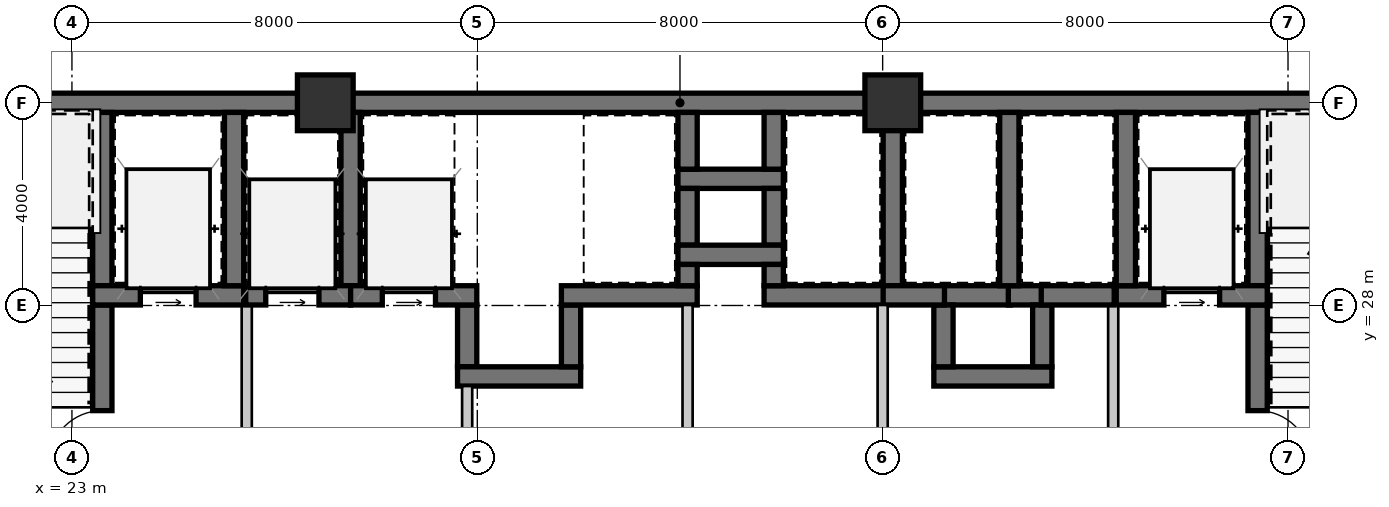
"""IFC4 building model, lengths in metres.
Left out: names, types, materials, properties, quantities, classifications, styles, units other than length and angle.
Written with IfcOpenShell. Run it as: python <this file> out.ifc"""

import sys

from ifc_helpers import new_model, si_unit, direction, frame, frame_2d, origin, origin_2d, place, context, subcontext, project, spatial, rectangle, extrude, source, transform, mapped, element, fill, save


model = new_model("IFC4")
c1 = context("Model", 3, precision=1e-05, world=origin(), true_north=direction((0.0, 1.0)))
c2 = subcontext(c1, "Body", "Model", "MODEL_VIEW")
j1 = project(units=[si_unit("LENGTHUNIT", "METRE"), si_unit("PLANEANGLEUNIT", "RADIAN")], contexts=[c1])
p1 = place(None, origin())
s1 = spatial("IfcSite", under=j1, at=p1, CompositionType="ELEMENT")
p2 = place(p1, origin())
s2 = spatial("IfcBuilding", under=s1, at=p2, CompositionType="ELEMENT")
p3 = place(p2, frame((0.0, 0.0, 8.4)))
s3 = spatial("IfcBuildingStorey", under=s2, at=p3, CompositionType="ELEMENT", Elevation=8.4)
m1 = source(origin(), c2, "Body", "SweptSolid", [
    extrude(rectangle(XDim=1.1, YDim=1.1, at=origin_2d()), origin(), (0.0, 0.0, 1.0), 4.55),
])
for number, where, z_axis, x_axis in (
    (1, (28.0, 32.0, 0.0), (0.0, 0.0, 1.0), (1.0, 0.0, 0.0)),
    (2, (39.2, 32.0, 0.0), (0.0, 0.0, 1.0), (1.0, 0.0, 0.0)),
):
    element("IfcColumn", number, at=place(p3, frame(where, z_axis=z_axis, x_axis=x_axis)), inside=s3, PredefinedType="COLUMN", context=c2, shape_type="MappedRepresentation", body=[
        mapped(m1, transform((0.0, 0.0, 0.0), scale=1.0)),
    ])
m2 = source(origin(), c2, "Body", "SweptSolid", [
    extrude(rectangle(XDim=9.19, YDim=0.38, at=frame_2d((4.595, 0.0))), origin(), (0.0, 0.0, 1.0), 4.29),
])
p4 = place(p3, frame((18.81, 32.0, 0.0), z_axis=(0.0, 0.0, 1.0), x_axis=(1.0, 0.0, 0.0)))
e3 = element("IfcWall", 3, at=p4, inside=s3, PredefinedType="SHEAR", context=c2, shape_type="MappedRepresentation", body=[
    mapped(m2, transform((0.0, 0.0, 0.0), scale=1.0)),
])
m3 = source(origin(), c2, "Body", "SweptSolid", [
    extrude(rectangle(XDim=11.2, YDim=0.38, at=frame_2d((5.6, 0.0))), origin(), (0.0, 0.0, 1.0), 4.29),
])
p5 = place(p3, frame((28.0, 32.0, 0.0), z_axis=(0.0, 0.0, 1.0), x_axis=(1.0, 0.0, 0.0)))
e4 = element("IfcWall", 4, at=p5, inside=s3, PredefinedType="SHEAR", context=c2, shape_type="MappedRepresentation", body=[
    mapped(m3, transform((0.0, 0.0, 0.0), scale=1.0)),
])
m4 = source(origin(), c2, "Body", "SweptSolid", [
    extrude(rectangle(XDim=11.99, YDim=0.38, at=frame_2d((5.995, 0.0))), origin(), (0.0, 0.0, 1.0), 4.29),
])
p6 = place(p3, frame((39.2, 32.0, 0.0), z_axis=(0.0, 0.0, 1.0), x_axis=(1.0, 0.0, 0.0)))
e5 = element("IfcWall", 5, at=p6, inside=s3, PredefinedType="SHEAR", context=c2, shape_type="MappedRepresentation", body=[
    mapped(m4, transform((0.0, 0.0, 0.0), scale=1.0)),
])
m5 = source(origin(), c2, "Body", "SweptSolid", [
    extrude(rectangle(XDim=3.42, YDim=0.38, at=frame_2d((1.71, 0.0))), origin(), (0.0, 0.0, 1.0), 4.29),
])
p7 = place(p3, frame((23.6, 28.39, 0.0), z_axis=(0.0, 0.0, 1.0), x_axis=(0.0, 1.0, 0.0)))
e6 = element("IfcWall", 6, at=p7, inside=s3, PredefinedType="SHEAR", context=c2, shape_type="MappedRepresentation", body=[
    mapped(m5, transform((0.0, 0.0, 0.0), scale=1.0)),
])
m6 = source(origin(), c2, "Body", "SweptSolid", [
    extrude(rectangle(XDim=3.82, YDim=0.38, at=frame_2d((1.91, 0.0))), origin(), (0.0, 0.0, 1.0), 4.29),
])
p8 = place(p3, frame((23.6, 24.19, 0.0), z_axis=(0.0, 0.0, 1.0), x_axis=(0.0, 1.0, 0.0)))
e7 = element("IfcWall", 7, at=p8, inside=s3, PredefinedType="SHEAR", context=c2, shape_type="MappedRepresentation", body=[
    mapped(m6, transform((0.0, 0.0, 0.0), scale=1.0)),
])
m7 = source(origin(), c2, "Body", "SweptSolid", [
    extrude(rectangle(XDim=1.05, YDim=2.1, at=frame_2d((0.525, 1.05))), frame((0.0, 0.2, 0.0), z_axis=(0.0, -1.0, 0.0), x_axis=(1.0, 0.0, 0.0)), (0.0, 0.0, 1.0), 0.4),
])
p9 = place(p8, frame((0.685, 0.0, 0.0)))
e8 = element("IfcOpeningElement", 8, at=p9, cuts=e7, PredefinedType="OPENING", context=c2, shape_type="MappedRepresentation", body=[
    mapped(m7, transform((0.0, 0.0, 0.0), scale=1.0)),
])
m8 = source(origin(), c2, "Body", "SweptSolid", [
    extrude(rectangle(XDim=2.98, YDim=0.38, at=frame_2d((1.49, 0.0))), origin(), (0.0, 0.0, 1.0), 4.29),
])
p10 = place(p3, frame((23.41, 28.2, 0.0), z_axis=(0.0, 0.0, 1.0), x_axis=(1.0, 0.0, 0.0)))
e9 = element("IfcWall", 9, at=p10, inside=s3, PredefinedType="SHEAR", context=c2, shape_type="MappedRepresentation", body=[
    mapped(m8, transform((0.0, 0.0, 0.0), scale=1.0)),
])
m9 = source(origin(), c2, "Body", "SweptSolid", [
    extrude(rectangle(XDim=1.1, YDim=2.15, at=frame_2d((0.55, 1.075))), frame((0.0, 0.2, 0.0), z_axis=(0.0, -1.0, 0.0), x_axis=(1.0, 0.0, 0.0)), (0.0, 0.0, 1.0), 0.4),
])
p11 = place(p10, frame((0.94, 0.0, 0.0)))
e10 = element("IfcOpeningElement", 10, at=p11, cuts=e9, PredefinedType="OPENING", context=c2, shape_type="MappedRepresentation", body=[
    mapped(m9, transform((0.0, 0.0, 0.0), scale=1.0)),
])
p12 = place(p3, frame((26.2, 28.39, 0.0), z_axis=(0.0, 0.0, 1.0), x_axis=(0.0, 1.0, 0.0)))
e11 = element("IfcWall", 11, at=p12, inside=s3, PredefinedType="SHEAR", context=c2, shape_type="MappedRepresentation", body=[
    mapped(m5, transform((0.0, 0.0, 0.0), scale=1.0)),
])
m10 = source(origin(), c2, "Body", "SweptSolid", [
    extrude(rectangle(XDim=3.91, YDim=0.2, at=frame_2d((1.955, 0.0))), origin(), (0.0, 0.0, 1.0), 4.29),
])
p13 = place(p3, frame((26.45, 24.1, 0.0), z_axis=(0.0, 0.0, 1.0), x_axis=(0.0, 1.0, 0.0)))
e12 = element("IfcWall", 12, at=p13, inside=s3, PredefinedType="SOLIDWALL", context=c2, shape_type="MappedRepresentation", body=[
    mapped(m10, transform((0.0, 0.0, 0.0), scale=1.0)),
])
p14 = place(p3, frame((46.4, 31.81, 0.0), z_axis=(0.0, 0.0, 1.0), x_axis=(0.0, -1.0, 0.0)))
e13 = element("IfcWall", 13, at=p14, inside=s3, PredefinedType="SHEAR", context=c2, shape_type="MappedRepresentation", body=[
    mapped(m5, transform((0.0, 0.0, 0.0), scale=1.0)),
])
p15 = place(p3, frame((46.4, 28.01, 0.0), z_axis=(0.0, 0.0, 1.0), x_axis=(0.0, -1.0, 0.0)))
e14 = element("IfcWall", 14, at=p15, inside=s3, PredefinedType="SHEAR", context=c2, shape_type="MappedRepresentation", body=[
    mapped(m6, transform((0.0, 0.0, 0.0), scale=1.0)),
])
p16 = place(p15, frame((2.085, 0.0, 0.0)))
e15 = element("IfcOpeningElement", 15, at=p16, cuts=e14, PredefinedType="OPENING", context=c2, shape_type="MappedRepresentation", body=[
    mapped(m7, transform((0.0, 0.0, 0.0), scale=1.0)),
])
p17 = place(p3, frame((43.61, 28.2, 0.0), z_axis=(0.0, 0.0, 1.0), x_axis=(1.0, 0.0, 0.0)))
e16 = element("IfcWall", 16, at=p17, inside=s3, PredefinedType="SHEAR", context=c2, shape_type="MappedRepresentation", body=[
    mapped(m8, transform((0.0, 0.0, 0.0), scale=1.0)),
])
p18 = place(p17, frame((0.94, 0.0, 0.0)))
e17 = element("IfcOpeningElement", 17, at=p18, cuts=e16, PredefinedType="OPENING", context=c2, shape_type="MappedRepresentation", body=[
    mapped(m9, transform((0.0, 0.0, 0.0), scale=1.0)),
])
p19 = place(p3, frame((43.8, 31.81, 0.0), z_axis=(0.0, 0.0, 1.0), x_axis=(0.0, -1.0, 0.0)))
e18 = element("IfcWall", 18, at=p19, inside=s3, PredefinedType="SHEAR", context=c2, shape_type="MappedRepresentation", body=[
    mapped(m5, transform((0.0, 0.0, 0.0), scale=1.0)),
])
p20 = place(p3, frame((43.55, 28.01, 0.0), z_axis=(0.0, 0.0, 1.0), x_axis=(0.0, -1.0, 0.0)))
e19 = element("IfcWall", 19, at=p20, inside=s3, PredefinedType="SOLIDWALL", context=c2, shape_type="MappedRepresentation", body=[
    mapped(m10, transform((0.0, 0.0, 0.0), scale=1.0)),
])
m11 = source(origin(), c2, "Body", "SweptSolid", [
    extrude(rectangle(XDim=2.08, YDim=0.38, at=frame_2d((1.04, 0.0))), origin(), (0.0, 0.0, 1.0), 4.29),
])
p21 = place(p3, frame((34.96, 30.5, 0.0), z_axis=(0.0, 0.0, 1.0), x_axis=(1.0, 0.0, 0.0)))
e20 = element("IfcWall", 20, at=p21, inside=s3, PredefinedType="SHEAR", context=c2, shape_type="MappedRepresentation", body=[
    mapped(m11, transform((0.0, 0.0, 0.0), scale=1.0)),
])
m12 = source(origin(), c2, "Body", "SweptSolid", [
    extrude(rectangle(XDim=1.12, YDim=0.38, at=frame_2d((0.56, 0.0))), origin(), (0.0, 0.0, 1.0), 4.29),
])
for number, where, z_axis, x_axis in (
    (21, (35.15, 31.81, 0.0), (0.0, 0.0, 1.0), (0.0, -1.0, 0.0)),
    (22, (36.85, 30.69, 0.0), (0.0, 0.0, 1.0), (0.0, 1.0, 0.0)),
    (23, (35.15, 30.31, 0.0), (0.0, 0.0, 1.0), (0.0, -1.0, 0.0)),
    (24, (36.85, 29.19, 0.0), (0.0, 0.0, 1.0), (0.0, 1.0, 0.0)),
):
    element("IfcWall", number, at=place(p3, frame(where, z_axis=z_axis, x_axis=x_axis)), inside=s3, PredefinedType="SHEAR", context=c2, shape_type="MappedRepresentation", body=[
        mapped(m12, transform((0.0, 0.0, 0.0), scale=1.0)),
    ])
p22 = place(p3, frame((34.96, 29.0, 0.0), z_axis=(0.0, 0.0, 1.0), x_axis=(1.0, 0.0, 0.0)))
e25 = element("IfcWall", 25, at=p22, inside=s3, PredefinedType="SHEAR", context=c2, shape_type="MappedRepresentation", body=[
    mapped(m11, transform((0.0, 0.0, 0.0), scale=1.0)),
])
m13 = source(origin(), c2, "Body", "SweptSolid", [
    extrude(rectangle(XDim=1.22, YDim=0.38, at=frame_2d((0.61, 0.0))), origin(), (0.0, 0.0, 1.0), 4.29),
])
p23 = place(p3, frame((30.8, 28.01, 0.0), z_axis=(0.0, 0.0, 1.0), x_axis=(0.0, -1.0, 0.0)))
e26 = element("IfcWall", 26, at=p23, inside=s3, PredefinedType="SHEAR", context=c2, shape_type="MappedRepresentation", body=[
    mapped(m13, transform((0.0, 0.0, 0.0), scale=1.0)),
])
m14 = source(origin(), c2, "Body", "SweptSolid", [
    extrude(rectangle(XDim=2.43, YDim=0.38, at=frame_2d((1.215, 0.0))), origin(), (0.0, 0.0, 1.0), 4.29),
])
p24 = place(p3, frame((30.61, 26.6, 0.0), z_axis=(0.0, 0.0, 1.0), x_axis=(1.0, 0.0, 0.0)))
e27 = element("IfcWall", 27, at=p24, inside=s3, PredefinedType="SHEAR", context=c2, shape_type="MappedRepresentation", body=[
    mapped(m14, transform((0.0, 0.0, 0.0), scale=1.0)),
])
p25 = place(p3, frame((32.85, 26.79, 0.0), z_axis=(0.0, 0.0, 1.0), x_axis=(0.0, 1.0, 0.0)))
e28 = element("IfcWall", 28, at=p25, inside=s3, PredefinedType="SHEAR", context=c2, shape_type="MappedRepresentation", body=[
    mapped(m13, transform((0.0, 0.0, 0.0), scale=1.0)),
])
m15 = source(origin(), c2, "Body", "SweptSolid", [
    extrude(rectangle(XDim=1.32, YDim=0.38, at=frame_2d((0.66, 0.0))), origin(), (0.0, 0.0, 1.0), 4.29),
])
p26 = place(p3, frame((41.52, 28.2, 0.0), z_axis=(0.0, 0.0, 1.0), x_axis=(-1.0, 0.0, 0.0)))
e29 = element("IfcWall", 29, at=p26, inside=s3, PredefinedType="SHEAR", context=c2, shape_type="MappedRepresentation", body=[
    mapped(m15, transform((0.0, 0.0, 0.0), scale=1.0)),
])
m16 = source(origin(), c2, "Body", "SweptSolid", [
    extrude(rectangle(XDim=0.67, YDim=0.38, at=frame_2d((0.335, 0.0))), origin(), (0.0, 0.0, 1.0), 4.29),
])
p27 = place(p3, frame((42.15, 28.2, 0.0), z_axis=(0.0, 0.0, 1.0), x_axis=(-1.0, 0.0, 0.0)))
e30 = element("IfcWall", 30, at=p27, inside=s3, PredefinedType="SHEAR", context=c2, shape_type="MappedRepresentation", body=[
    mapped(m16, transform((0.0, 0.0, 0.0), scale=1.0)),
])
m17 = source(origin(), c2, "Body", "SweptSolid", [
    extrude(rectangle(XDim=2.33, YDim=0.38, at=frame_2d((1.165, 0.0))), origin(), (0.0, 0.0, 1.0), 4.29),
])
p28 = place(p3, frame((40.01, 26.6, 0.0), z_axis=(0.0, 0.0, 1.0), x_axis=(1.0, 0.0, 0.0)))
e31 = element("IfcWall", 31, at=p28, inside=s3, PredefinedType="SHEAR", context=c2, shape_type="MappedRepresentation", body=[
    mapped(m17, transform((0.0, 0.0, 0.0), scale=1.0)),
])
for number, where, z_axis, x_axis in (
    (32, (40.2, 28.01, 0.0), (0.0, 0.0, 1.0), (0.0, -1.0, 0.0)),
    (33, (42.15, 26.79, 0.0), (0.0, 0.0, 1.0), (0.0, 1.0, 0.0)),
):
    element("IfcWall", number, at=place(p3, frame(where, z_axis=z_axis, x_axis=x_axis)), inside=s3, PredefinedType="SHEAR", context=c2, shape_type="MappedRepresentation", body=[
        mapped(m13, transform((0.0, 0.0, 0.0), scale=1.0)),
    ])
p29 = place(p3, frame((28.5, 28.39, 0.0), z_axis=(0.0, 0.0, 1.0), x_axis=(0.0, 1.0, 0.0)))
e34 = element("IfcWall", 34, at=p29, inside=s3, PredefinedType="SHEAR", context=c2, shape_type="MappedRepresentation", body=[
    mapped(m5, transform((0.0, 0.0, 0.0), scale=1.0)),
])
m18 = source(origin(), c2, "Body", "SweptSolid", [
    extrude(rectangle(XDim=2.07, YDim=0.38, at=frame_2d((1.035, 0.0))), origin(), (0.0, 0.0, 1.0), 4.29),
])
p30 = place(p3, frame((26.43, 28.2, 0.0), z_axis=(0.0, 0.0, 1.0), x_axis=(1.0, 0.0, 0.0)))
e35 = element("IfcWall", 35, at=p30, inside=s3, PredefinedType="SHEAR", context=c2, shape_type="MappedRepresentation", body=[
    mapped(m18, transform((0.0, 0.0, 0.0), scale=1.0)),
])
m19 = source(origin(), c2, "Body", "SweptSolid", [
    extrude(rectangle(XDim=1.05, YDim=2.15, at=frame_2d((0.525, 1.075))), frame((0.0, 0.2, 0.0), z_axis=(0.0, -1.0, 0.0), x_axis=(1.0, 0.0, 0.0)), (0.0, 0.0, 1.0), 0.4),
])
p31 = place(p30, frame((0.395, 0.0, 0.0)))
e36 = element("IfcOpeningElement", 36, at=p31, cuts=e35, PredefinedType="OPENING", context=c2, shape_type="MappedRepresentation", body=[
    mapped(m19, transform((0.0, 0.0, 0.0), scale=1.0)),
])
m20 = source(origin(), c2, "Body", "SweptSolid", [
    extrude(rectangle(XDim=2.49, YDim=0.38, at=frame_2d((1.245, 0.0))), origin(), (0.0, 0.0, 1.0), 4.29),
])
p32 = place(p3, frame((28.5, 28.2, 0.0), z_axis=(0.0, 0.0, 1.0), x_axis=(1.0, 0.0, 0.0)))
e37 = element("IfcWall", 37, at=p32, inside=s3, PredefinedType="SHEAR", context=c2, shape_type="MappedRepresentation", body=[
    mapped(m20, transform((0.0, 0.0, 0.0), scale=1.0)),
])
p33 = place(p32, frame((0.625, 0.0, 0.0)))
e38 = element("IfcOpeningElement", 38, at=p33, cuts=e37, PredefinedType="OPENING", context=c2, shape_type="MappedRepresentation", body=[
    mapped(m19, transform((0.0, 0.0, 0.0), scale=1.0)),
])
m21 = source(origin(), c2, "Body", "SweptSolid", [
    extrude(rectangle(XDim=2.31, YDim=0.2, at=frame_2d((1.155, 0.0))), origin(), (0.0, 0.0, 1.0), 4.29),
])
p34 = place(p3, frame((30.8, 26.41, 0.0), z_axis=(0.0, 0.0, 1.0), x_axis=(0.0, -1.0, 0.0)))
e39 = element("IfcWall", 39, at=p34, inside=s3, PredefinedType="SOLIDWALL", context=c2, shape_type="MappedRepresentation", body=[
    mapped(m21, transform((0.0, 0.0, 0.0), scale=1.0)),
])
m22 = source(origin(), c2, "Body", "SweptSolid", [
    extrude(rectangle(XDim=2.68, YDim=0.38, at=frame_2d((1.34, 0.0))), origin(), (0.0, 0.0, 1.0), 4.29),
])
p35 = place(p3, frame((32.66, 28.2, 0.0), z_axis=(0.0, 0.0, 1.0), x_axis=(1.0, 0.0, 0.0)))
e40 = element("IfcWall", 40, at=p35, inside=s3, PredefinedType="SHEAR", context=c2, shape_type="MappedRepresentation", body=[
    mapped(m22, transform((0.0, 0.0, 0.0), scale=1.0)),
])
m23 = source(origin(), c2, "Body", "SweptSolid", [
    extrude(rectangle(XDim=0.42, YDim=0.38, at=frame_2d((0.21, 0.0))), origin(), (0.0, 0.0, 1.0), 4.29),
])
p36 = place(p3, frame((35.15, 28.39, 0.0), z_axis=(0.0, 0.0, 1.0), x_axis=(0.0, 1.0, 0.0)))
e41 = element("IfcWall", 41, at=p36, inside=s3, PredefinedType="SHEAR", context=c2, shape_type="MappedRepresentation", body=[
    mapped(m23, transform((0.0, 0.0, 0.0), scale=1.0)),
])
p37 = place(p3, frame((39.2, 28.39, 0.0), z_axis=(0.0, 0.0, 1.0), x_axis=(0.0, 1.0, 0.0)))
e42 = element("IfcWall", 42, at=p37, inside=s3, PredefinedType="SHEAR", context=c2, shape_type="MappedRepresentation", body=[
    mapped(m5, transform((0.0, 0.0, 0.0), scale=1.0)),
])
m24 = source(origin(), c2, "Body", "SweptSolid", [
    extrude(rectangle(XDim=2.36, YDim=0.38, at=frame_2d((1.18, 0.0))), origin(), (0.0, 0.0, 1.0), 4.29),
])
p38 = place(p3, frame((36.66, 28.2, 0.0), z_axis=(0.0, 0.0, 1.0), x_axis=(1.0, 0.0, 0.0)))
e43 = element("IfcWall", 43, at=p38, inside=s3, PredefinedType="SHEAR", context=c2, shape_type="MappedRepresentation", body=[
    mapped(m24, transform((0.0, 0.0, 0.0), scale=1.0)),
])
p39 = place(p3, frame((36.85, 28.81, 0.0), z_axis=(0.0, 0.0, 1.0), x_axis=(0.0, -1.0, 0.0)))
e44 = element("IfcWall", 44, at=p39, inside=s3, PredefinedType="SHEAR", context=c2, shape_type="MappedRepresentation", body=[
    mapped(m23, transform((0.0, 0.0, 0.0), scale=1.0)),
])
p40 = place(p3, frame((41.5, 28.39, 0.0), z_axis=(0.0, 0.0, 1.0), x_axis=(0.0, 1.0, 0.0)))
e45 = element("IfcWall", 45, at=p40, inside=s3, PredefinedType="SHEAR", context=c2, shape_type="MappedRepresentation", body=[
    mapped(m5, transform((0.0, 0.0, 0.0), scale=1.0)),
])
m25 = source(origin(), c2, "Body", "SweptSolid", [
    extrude(rectangle(XDim=1.21, YDim=0.38, at=frame_2d((0.605, 0.0))), origin(), (0.0, 0.0, 1.0), 4.29),
])
p41 = place(p3, frame((39.01, 28.2, 0.0), z_axis=(0.0, 0.0, 1.0), x_axis=(1.0, 0.0, 0.0)))
e46 = element("IfcWall", 46, at=p41, inside=s3, PredefinedType="SHEAR", context=c2, shape_type="MappedRepresentation", body=[
    mapped(m25, transform((0.0, 0.0, 0.0), scale=1.0)),
])
m26 = source(origin(), c2, "Body", "SweptSolid", [
    extrude(rectangle(XDim=1.44, YDim=0.38, at=frame_2d((0.72, 0.0))), origin(), (0.0, 0.0, 1.0), 4.29),
])
p42 = place(p3, frame((42.13, 28.2, 0.0), z_axis=(0.0, 0.0, 1.0), x_axis=(1.0, 0.0, 0.0)))
e47 = element("IfcWall", 47, at=p42, inside=s3, PredefinedType="SHEAR", context=c2, shape_type="MappedRepresentation", body=[
    mapped(m26, transform((0.0, 0.0, 0.0), scale=1.0)),
])
for number, where, z_axis, x_axis in (
    (48, (35.15, 28.01, 0.0), (0.0, 0.0, 1.0), (0.0, -1.0, 0.0)),
    (49, (39.0, 28.01, 0.0), (0.0, 0.0, 1.0), (0.0, -1.0, 0.0)),
):
    element("IfcWall", number, at=place(p3, frame(where, z_axis=z_axis, x_axis=x_axis)), inside=s3, PredefinedType="SOLIDWALL", context=c2, shape_type="MappedRepresentation", body=[
        mapped(m10, transform((0.0, 0.0, 0.0), scale=1.0)),
    ])
m27 = source(origin(), c2, "Body", "SweptSolid", [
    extrude(rectangle(XDim=1.05, YDim=2.1, at=frame_2d((0.525, 1.05))), frame((0.0, 0.025, 0.0), z_axis=(0.0, -1.0, 0.0), x_axis=(1.0, 0.0, 0.0)), (0.0, 0.0, 1.0), 0.05),
])
p43 = place(p9, origin())
e50 = element("IfcDoor", 50, at=p43, inside=s3, OperationType="SINGLE_SWING_LEFT", PredefinedType="DOOR", context=c2, shape_type="MappedRepresentation", body=[
    mapped(m27, transform((0.0, 0.0, 0.0), scale=1.0)),
])
fill(e8, e50)
m28 = source(origin(), c2, "Body", "SweptSolid", [
    extrude(rectangle(XDim=1.1, YDim=2.15, at=frame_2d((0.55, 1.075))), frame((0.0, 0.025, 0.0), z_axis=(0.0, -1.0, 0.0), x_axis=(1.0, 0.0, 0.0)), (0.0, 0.0, 1.0), 0.05),
])
p44 = place(p11, origin())
e51 = element("IfcDoor", 51, at=p44, inside=s3, OperationType="SLIDING_TO_LEFT", PredefinedType="DOOR", context=c2, shape_type="MappedRepresentation", body=[
    mapped(m28, transform((0.0, 0.0, 0.0), scale=1.0)),
])
fill(e10, e51)
p45 = place(p16, origin())
e52 = element("IfcDoor", 52, at=p45, inside=s3, OperationType="SINGLE_SWING_RIGHT", PredefinedType="DOOR", context=c2, shape_type="MappedRepresentation", body=[
    mapped(m27, transform((0.0, 0.0, 0.0), scale=1.0)),
])
fill(e15, e52)
p46 = place(p18, origin())
e53 = element("IfcDoor", 53, at=p46, inside=s3, OperationType="SLIDING_TO_LEFT", PredefinedType="DOOR", context=c2, shape_type="MappedRepresentation", body=[
    mapped(m28, transform((0.0, 0.0, 0.0), scale=1.0)),
])
fill(e17, e53)
m29 = source(origin(), c2, "Body", "SweptSolid", [
    extrude(rectangle(XDim=1.05, YDim=2.15, at=frame_2d((0.525, 1.075))), frame((0.0, 0.025, 0.0), z_axis=(0.0, -1.0, 0.0), x_axis=(1.0, 0.0, 0.0)), (0.0, 0.0, 1.0), 0.05),
])
p47 = place(p31, origin())
e54 = element("IfcDoor", 54, at=p47, inside=s3, OperationType="SLIDING_TO_LEFT", PredefinedType="DOOR", context=c2, shape_type="MappedRepresentation", body=[
    mapped(m29, transform((0.0, 0.0, 0.0), scale=1.0)),
])
fill(e36, e54)
p48 = place(p33, origin())
e55 = element("IfcDoor", 55, at=p48, inside=s3, OperationType="SLIDING_TO_LEFT", PredefinedType="DOOR", context=c2, shape_type="MappedRepresentation", body=[
    mapped(m29, transform((0.0, 0.0, 0.0), scale=1.0)),
])
fill(e38, e55)
save(model, sys.argv[1])
